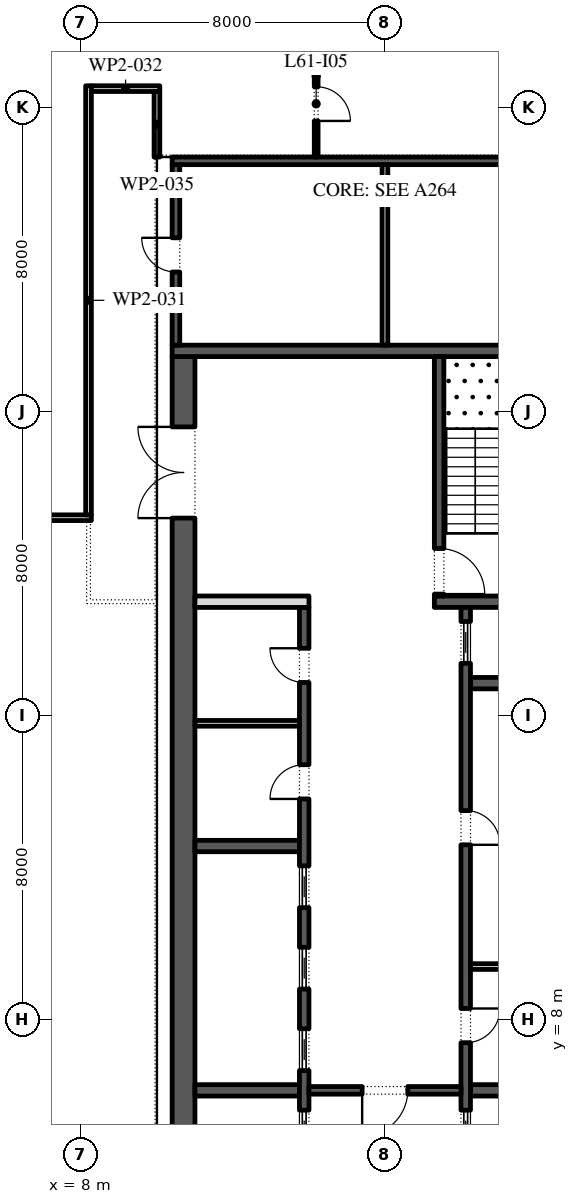
"""IFC4 building model, lengths in metres.
Left out: names, types, materials, properties, quantities, classifications, styles, units other than length and angle.
Written with IfcOpenShell. Run it as: python <this file> out.ifc"""

import sys

from ifc_helpers import new_model, si_unit, direction, frame, frame_2d, origin, place, context, subcontext, project, spatial, rectangle, extrude, element, fill, save


model = new_model("IFC4")
c1 = context("Model", 3, precision=1e-05, world=origin(), true_north=direction((0.0, 1.0)))
c2 = subcontext(c1, "Body", "Model", "MODEL_VIEW")
j1 = project(units=[si_unit("LENGTHUNIT", "METRE"), si_unit("PLANEANGLEUNIT", "RADIAN")], contexts=[c1])
p1 = place(None, origin())
s1 = spatial("IfcSite", under=j1, at=p1, CompositionType="ELEMENT")
p2 = place(p1, origin())
s2 = spatial("IfcBuilding", under=s1, at=p2, CompositionType="ELEMENT")
p3 = place(p2, frame((0.0, 0.0, 280.8)))
s3 = spatial("IfcBuildingStorey", under=s2, at=p3, CompositionType="ELEMENT", Elevation=280.8)
p4 = place(p3, frame((10.7, -2.45, 0.0), z_axis=(0.0, 0.0, 1.0), x_axis=(0.0, 1.0, 0.0)))
e1 = element("IfcWall", 1, at=p4, inside=s3, PredefinedType="SHEAR", context=c2, shape_type="SweptSolid", body=[
    extrude(rectangle(XDim=27.9, YDim=0.6, at=frame_2d((13.95, 0.0))), origin(), (0.0, 0.0, 1.0), 4.0),
])
p5 = place(p4, frame((23.65, 0.0, 0.0)))
e2 = element("IfcOpeningElement", 2, at=p5, cuts=e1, PredefinedType="OPENING", context=c2, shape_type="SweptSolid", body=[
    extrude(rectangle(XDim=2.4, YDim=2.1, at=frame_2d((1.2, 1.05))), frame((0.0, 0.31, 0.0), z_axis=(0.0, -1.0, 0.0), x_axis=(1.0, 0.0, 0.0)), (0.0, 0.0, 1.0), 0.62),
])
p6 = place(p4, frame((1.087, 0.0, 0.0)))
e3 = element("IfcOpeningElement", 3, at=p6, cuts=e1, PredefinedType="OPENING", context=c2, shape_type="SweptSolid", body=[
    extrude(rectangle(XDim=0.9, YDim=2.1, at=frame_2d((0.45, 1.05))), frame((0.0, 0.31, 0.0), z_axis=(0.0, -1.0, 0.0), x_axis=(1.0, 0.0, 0.0)), (0.0, 0.0, 1.0), 0.62),
])
p7 = place(p4, frame((4.262, 0.0, 0.0)))
e4 = element("IfcOpeningElement", 4, at=p7, cuts=e1, PredefinedType="OPENING", context=c2, shape_type="SweptSolid", body=[
    extrude(rectangle(XDim=1.0, YDim=2.1, at=frame_2d((0.5, 1.05))), frame((0.0, 0.31, 0.0), z_axis=(0.0, -1.0, 0.0), x_axis=(1.0, 0.0, 0.0)), (0.0, 0.0, 1.0), 0.62),
])
p8 = place(p3, frame((10.4, 25.6, 0.0), z_axis=(0.0, 0.0, 1.0), x_axis=(1.0, 0.0, 0.0)))
e5 = element("IfcWall", 5, at=p8, inside=s3, PredefinedType="SHEAR", context=c2, shape_type="SweptSolid", body=[
    extrude(rectangle(XDim=11.2, YDim=0.3, at=frame_2d((5.6, 0.0))), origin(), (0.0, 0.0, 1.0), 4.0),
])
p9 = place(p3, frame((17.3, 19.0, 0.0), z_axis=(0.0, 0.0, 1.0), x_axis=(1.0, 0.0, 0.0)))
e6 = element("IfcWall", 6, at=p9, inside=s3, PredefinedType="SHEAR", context=c2, shape_type="SweptSolid", body=[
    extrude(rectangle(XDim=3.7, YDim=0.3, at=frame_2d((1.85, 0.0))), origin(), (0.0, 0.0, 1.0), 4.0),
])
p10 = place(p3, frame((17.425, 19.15, 0.0), z_axis=(0.0, 0.0, 1.0), x_axis=(0.0, 1.0, 0.0)))
e7 = element("IfcWall", 7, at=p10, inside=s3, PredefinedType="SHEAR", context=c2, shape_type="SweptSolid", body=[
    extrude(rectangle(XDim=6.3, YDim=0.25, at=frame_2d((3.15, 0.0))), origin(), (0.0, 0.0, 1.0), 4.0),
])
p11 = place(p10, frame((0.05, 0.0, 0.0)))
e8 = element("IfcOpeningElement", 8, at=p11, cuts=e7, PredefinedType="OPENING", context=c2, shape_type="SweptSolid", body=[
    extrude(rectangle(XDim=1.2, YDim=2.1, at=frame_2d((0.6, 1.05))), frame((0.0, 0.135, 0.0), z_axis=(0.0, -1.0, 0.0), x_axis=(1.0, 0.0, 0.0)), (0.0, 0.0, 1.0), 0.27),
])
for number, where, z_axis, x_axis in (
    (9, (18.25, 6.143, 0.0), (0.0, 0.0, 1.0), (1.0, 0.0, 0.0)),
    (10, (18.25, 16.857, 0.0), (0.0, 0.0, 1.0), (1.0, 0.0, 0.0)),
):
    element("IfcWall", number, at=place(p3, frame(where, z_axis=z_axis, x_axis=x_axis)), inside=s3, PredefinedType="SHEAR", context=c2, shape_type="SweptSolid", body=[
        extrude(rectangle(XDim=2.75, YDim=0.3, at=frame_2d((1.375, 0.0))), origin(), (0.0, 0.0, 1.0), 4.0),
    ])
p12 = place(p3, frame((18.125, 4.15, 0.0), z_axis=(0.0, 0.0, 1.0), x_axis=(0.0, 1.0, 0.0)))
e11 = element("IfcWall", 11, at=p12, inside=s3, PredefinedType="SHEAR", context=c2, shape_type="SweptSolid", body=[
    extrude(rectangle(XDim=14.7, YDim=0.25, at=frame_2d((7.35, 0.0))), origin(), (0.0, 0.0, 1.0), 4.0),
])
p13 = place(p12, frame((3.246, 0.0, 0.0)))
e12 = element("IfcOpeningElement", 12, at=p13, cuts=e11, PredefinedType="OPENING", context=c2, shape_type="SweptSolid", body=[
    extrude(rectangle(XDim=0.9, YDim=2.1, at=frame_2d((0.45, 1.05))), frame((0.0, 0.135, 0.0), z_axis=(0.0, -1.0, 0.0), x_axis=(1.0, 0.0, 0.0)), (0.0, 0.0, 1.0), 0.27),
])
p14 = place(p12, frame((8.454, 0.0, 0.0)))
e13 = element("IfcOpeningElement", 13, at=p14, cuts=e11, PredefinedType="OPENING", context=c2, shape_type="SweptSolid", body=[
    extrude(rectangle(XDim=0.9, YDim=2.1, at=frame_2d((0.45, 1.05))), frame((0.0, 0.135, 0.0), z_axis=(0.0, -1.0, 0.0), x_axis=(1.0, 0.0, 0.0)), (0.0, 0.0, 1.0), 0.27),
])
p15 = place(p12, frame((0.371, 0.0, 0.0)))
e14 = element("IfcOpeningElement", 14, at=p15, cuts=e11, PredefinedType="OPENING", context=c2, shape_type="SweptSolid", body=[
    extrude(rectangle(XDim=1.1, YDim=2.1, at=frame_2d((0.55, 1.05))), frame((0.0, 0.135, 0.0), z_axis=(0.0, -1.0, 0.0), x_axis=(1.0, 0.0, 0.0)), (0.0, 0.0, 1.0), 0.27),
])
p16 = place(p12, frame((13.229, 0.0, 0.0)))
e15 = element("IfcOpeningElement", 15, at=p16, cuts=e11, PredefinedType="OPENING", context=c2, shape_type="SweptSolid", body=[
    extrude(rectangle(XDim=1.1, YDim=2.1, at=frame_2d((0.55, 1.05))), frame((0.0, 0.135, 0.0), z_axis=(0.0, -1.0, 0.0), x_axis=(1.0, 0.0, 0.0)), (0.0, 0.0, 1.0), 0.27),
])
p17 = place(p3, frame((18.25, 9.4, 0.0), z_axis=(0.0, 0.0, 1.0), x_axis=(1.0, 0.0, 0.0)))
e16 = element("IfcWall", 16, at=p17, inside=s3, PredefinedType="PARTITIONING", context=c2, shape_type="SweptSolid", body=[
    extrude(rectangle(XDim=2.75, YDim=0.15, at=frame_2d((1.375, 0.0))), origin(), (0.0, 0.0, 1.0), 4.0),
])
for number, where, z_axis, x_axis in (
    (17, (11.0, 6.143, 0.0), (0.0, 0.0, 1.0), (1.0, 0.0, 0.0)),
    (18, (11.0, 12.571, 0.0), (0.0, 0.0, 1.0), (1.0, 0.0, 0.0)),
):
    element("IfcWall", number, at=place(p3, frame(where, z_axis=z_axis, x_axis=x_axis)), inside=s3, PredefinedType="SHEAR", context=c2, shape_type="SweptSolid", body=[
        extrude(rectangle(XDim=2.75, YDim=0.3, at=frame_2d((1.375, 0.0))), origin(), (0.0, 0.0, 1.0), 4.0),
    ])
p18 = place(p3, frame((13.875, -2.45, 0.0), z_axis=(0.0, 0.0, 1.0), x_axis=(0.0, 1.0, 0.0)))
e19 = element("IfcWall", 19, at=p18, inside=s3, PredefinedType="SHEAR", context=c2, shape_type="SweptSolid", body=[
    extrude(rectangle(XDim=21.3, YDim=0.25, at=frame_2d((10.65, 0.0))), origin(), (0.0, 0.0, 1.0), 4.0),
])
p19 = place(p18, frame((16.261, 0.0, 0.0)))
e20 = element("IfcOpeningElement", 20, at=p19, cuts=e19, PredefinedType="OPENING", context=c2, shape_type="SweptSolid", body=[
    extrude(rectangle(XDim=0.9, YDim=2.1, at=frame_2d((0.45, 1.05))), frame((0.0, 0.135, 0.0), z_axis=(0.0, -1.0, 0.0), x_axis=(1.0, 0.0, 0.0)), (0.0, 0.0, 1.0), 0.27),
])
p20 = place(p18, frame((19.325, 0.0, 0.0)))
e21 = element("IfcOpeningElement", 21, at=p20, cuts=e19, PredefinedType="OPENING", context=c2, shape_type="SweptSolid", body=[
    extrude(rectangle(XDim=0.9, YDim=2.1, at=frame_2d((0.45, 1.05))), frame((0.0, 0.135, 0.0), z_axis=(0.0, -1.0, 0.0), x_axis=(1.0, 0.0, 0.0)), (0.0, 0.0, 1.0), 0.27),
])
p21 = place(p18, frame((6.971, 0.0, 0.0)))
e22 = element("IfcOpeningElement", 22, at=p21, cuts=e19, PredefinedType="OPENING", context=c2, shape_type="SweptSolid", body=[
    extrude(rectangle(XDim=1.1, YDim=2.1, at=frame_2d((0.55, 1.05))), frame((0.0, 0.135, 0.0), z_axis=(0.0, -1.0, 0.0), x_axis=(1.0, 0.0, 0.0)), (0.0, 0.0, 1.0), 0.27),
])
p22 = place(p18, frame((9.114, 0.0, 0.0)))
e23 = element("IfcOpeningElement", 23, at=p22, cuts=e19, PredefinedType="OPENING", context=c2, shape_type="SweptSolid", body=[
    extrude(rectangle(XDim=1.1, YDim=2.1, at=frame_2d((0.55, 1.05))), frame((0.0, 0.135, 0.0), z_axis=(0.0, -1.0, 0.0), x_axis=(1.0, 0.0, 0.0)), (0.0, 0.0, 1.0), 0.27),
])
p23 = place(p18, frame((11.257, 0.0, 0.0)))
e24 = element("IfcOpeningElement", 24, at=p23, cuts=e19, PredefinedType="OPENING", context=c2, shape_type="SweptSolid", body=[
    extrude(rectangle(XDim=1.1, YDim=2.1, at=frame_2d((0.55, 1.05))), frame((0.0, 0.135, 0.0), z_axis=(0.0, -1.0, 0.0), x_axis=(1.0, 0.0, 0.0)), (0.0, 0.0, 1.0), 0.27),
])
p24 = place(p18, frame((13.4, 0.0, 0.0)))
e25 = element("IfcOpeningElement", 25, at=p24, cuts=e19, PredefinedType="OPENING", context=c2, shape_type="SweptSolid", body=[
    extrude(rectangle(XDim=1.1, YDim=2.1, at=frame_2d((0.55, 1.05))), frame((0.0, 0.135, 0.0), z_axis=(0.0, -1.0, 0.0), x_axis=(1.0, 0.0, 0.0)), (0.0, 0.0, 1.0), 0.27),
])
p25 = place(p3, frame((11.0, 19.0, 0.0), z_axis=(0.0, 0.0, 1.0), x_axis=(1.0, 0.0, 0.0)))
e26 = element("IfcWall", 26, at=p25, inside=s3, PredefinedType="PARTITIONING", context=c2, shape_type="SweptSolid", body=[
    extrude(rectangle(XDim=3.0, YDim=0.3, at=frame_2d((1.5, 0.0))), origin(), (0.0, 0.0, 1.0), 4.0),
])
p26 = place(p3, frame((11.0, 15.8, 0.0), z_axis=(0.0, 0.0, 1.0), x_axis=(1.0, 0.0, 0.0)))
e27 = element("IfcWall", 27, at=p26, inside=s3, PredefinedType="PARTITIONING", context=c2, shape_type="SweptSolid", body=[
    extrude(rectangle(XDim=2.75, YDim=0.15, at=frame_2d((1.375, 0.0))), origin(), (0.0, 0.0, 1.0), 4.0),
])
p27 = place(p3, frame((14.0, 6.143, 0.0), z_axis=(0.0, 0.0, 1.0), x_axis=(1.0, 0.0, 0.0)))
e28 = element("IfcWall", 28, at=p27, inside=s3, PredefinedType="SHEAR", context=c2, shape_type="SweptSolid", body=[
    extrude(rectangle(XDim=4.0, YDim=0.2, at=frame_2d((2.0, 0.0))), origin(), (0.0, 0.0, 1.0), 4.0),
])
p28 = place(p27, frame((1.4, 0.0, 0.0)))
e29 = element("IfcOpeningElement", 29, at=p28, cuts=e28, PredefinedType="OPENING", context=c2, shape_type="SweptSolid", body=[
    extrude(rectangle(XDim=1.2, YDim=2.1, at=frame_2d((0.6, 1.05))), frame((0.0, 0.11, 0.0), z_axis=(0.0, -1.0, 0.0), x_axis=(1.0, 0.0, 0.0)), (0.0, 0.0, 1.0), 0.22),
])
p29 = place(p3, frame((10.5, 25.75, 0.0), z_axis=(0.0, 0.0, 1.0), x_axis=(0.0, 1.0, 0.0)))
e30 = element("IfcWall", 30, at=p29, inside=s3, PredefinedType="SHEAR", context=c2, shape_type="SweptSolid", body=[
    extrude(rectangle(XDim=4.75, YDim=0.2, at=frame_2d((2.375, 0.0))), origin(), (0.0, 0.0, 1.0), 4.0),
])
p30 = place(p29, frame((1.925, 0.0, 0.0)))
e31 = element("IfcOpeningElement", 31, at=p30, cuts=e30, PredefinedType="OPENING", context=c2, shape_type="SweptSolid", body=[
    extrude(rectangle(XDim=0.9, YDim=2.1, at=frame_2d((0.45, 1.05))), frame((0.0, 0.11, 0.0), z_axis=(0.0, -1.0, 0.0), x_axis=(1.0, 0.0, 0.0)), (0.0, 0.0, 1.0), 0.22),
])
p31 = place(p3, frame((10.4, 30.6, 0.0), z_axis=(0.0, 0.0, 1.0), x_axis=(1.0, 0.0, 0.0)))
e32 = element("IfcWall", 32, at=p31, inside=s3, PredefinedType="SHEAR", context=c2, shape_type="SweptSolid", body=[
    extrude(rectangle(XDim=11.2, YDim=0.2, at=frame_2d((5.6, 0.0))), origin(), (0.0, 0.0, 1.0), 4.0),
])
p32 = place(p3, frame((16.0, 25.75, 0.0), z_axis=(0.0, 0.0, 1.0), x_axis=(0.0, 1.0, 0.0)))
e33 = element("IfcWall", 33, at=p32, inside=s3, PredefinedType="PARTITIONING", context=c2, shape_type="SweptSolid", body=[
    extrude(rectangle(XDim=4.75, YDim=0.15, at=frame_2d((2.375, 0.0))), origin(), (0.0, 0.0, 1.0), 4.0),
])
p33 = place(p3, frame((0.915, 21.21, 0.0), z_axis=(0.0, 0.0, 1.0), x_axis=(1.0, 0.0, 0.0)))
e34 = element("IfcWall", 34, at=p33, inside=s3, PredefinedType="PARTITIONING", context=c2, shape_type="SweptSolid", body=[
    extrude(rectangle(XDim=7.36, YDim=0.15, at=frame_2d((3.68, 0.0))), origin(), (0.0, 0.0, 1.0), 4.0),
])
p34 = place(p3, frame((8.2, 21.285, 0.0), z_axis=(0.0, 0.0, 1.0), x_axis=(0.0, 1.0, 0.0)))
e35 = element("IfcWall", 35, at=p34, inside=s3, PredefinedType="PARTITIONING", context=c2, shape_type="SweptSolid", body=[
    extrude(rectangle(XDim=11.29, YDim=0.15, at=frame_2d((5.645, 0.0))), origin(), (0.0, 0.0, 1.0), 4.0),
])
p35 = place(p3, frame((8.275, 32.5, 0.0), z_axis=(0.0, 0.0, 1.0), x_axis=(1.0, 0.0, 0.0)))
e36 = element("IfcWall", 36, at=p35, inside=s3, PredefinedType="PARTITIONING", context=c2, shape_type="SweptSolid", body=[
    extrude(rectangle(XDim=1.8, YDim=0.15, at=frame_2d((0.9, 0.0))), origin(), (0.0, 0.0, 1.0), 4.0),
])
p36 = place(p3, frame((10.0, 32.425, 0.0), z_axis=(0.0, 0.0, 1.0), x_axis=(0.0, -1.0, 0.0)))
e37 = element("IfcWall", 37, at=p36, inside=s3, PredefinedType="PARTITIONING", context=c2, shape_type="SweptSolid", body=[
    extrude(rectangle(XDim=1.725, YDim=0.15, at=frame_2d((0.863, 0.0))), origin(), (0.0, 0.0, 1.0), 4.0),
])
p37 = place(p3, frame((14.19, 34.95, 0.0), z_axis=(0.0, 0.0, 1.0), x_axis=(0.0, -1.0, 0.0)))
e38 = element("IfcWall", 38, at=p37, inside=s3, PredefinedType="PARTITIONING", context=c2, shape_type="SweptSolid", body=[
    extrude(rectangle(XDim=4.25, YDim=0.1, at=frame_2d((2.125, 0.0))), origin(), (0.0, 0.0, 1.0), 4.0),
])
p38 = place(p37, frame((2.4, 0.0, 0.0)))
e39 = element("IfcOpeningElement", 39, at=p38, cuts=e38, PredefinedType="OPENING", context=c2, shape_type="SweptSolid", body=[
    extrude(rectangle(XDim=0.9, YDim=2.1, at=frame_2d((0.45, 1.05))), frame((0.0, 0.06, 0.0), z_axis=(0.0, -1.0, 0.0), x_axis=(1.0, 0.0, 0.0)), (0.0, 0.0, 1.0), 0.12),
])
p39 = place(p13, frame((0.9, -0.2, 0.0), z_axis=(0.0, 0.0, 1.0), x_axis=(-1.0, 0.0, 0.0)))
e40 = element("IfcDoor", 40, at=p39, inside=s3, OperationType="SINGLE_SWING_RIGHT", PredefinedType="DOOR", context=c2, shape_type="SweptSolid", body=[
    extrude(rectangle(XDim=0.9, YDim=2.1, at=frame_2d((0.45, 1.05))), frame((0.0, -0.075, 0.0), z_axis=(0.0, -1.0, 0.0), x_axis=(1.0, 0.0, 0.0)), (0.0, 0.0, 1.0), 0.05),
])
fill(e12, e40)
p40 = place(p14, frame((0.9, -0.2, 0.0), z_axis=(0.0, 0.0, 1.0), x_axis=(-1.0, 0.0, 0.0)))
e41 = element("IfcDoor", 41, at=p40, inside=s3, OperationType="SINGLE_SWING_LEFT", PredefinedType="DOOR", context=c2, shape_type="SweptSolid", body=[
    extrude(rectangle(XDim=0.9, YDim=2.1, at=frame_2d((0.45, 1.05))), frame((0.0, -0.075, 0.0), z_axis=(0.0, -1.0, 0.0), x_axis=(1.0, 0.0, 0.0)), (0.0, 0.0, 1.0), 0.05),
])
fill(e13, e41)
p41 = place(p15, origin())
e42 = element("IfcDoor", 42, at=p41, inside=s3, OperationType="SLIDING_TO_LEFT", PredefinedType="DOOR", context=c2, shape_type="SweptSolid", body=[
    extrude(rectangle(XDim=1.1, YDim=2.1, at=frame_2d((0.55, 1.05))), frame((0.0, 0.025, 0.0), z_axis=(0.0, -1.0, 0.0), x_axis=(1.0, 0.0, 0.0)), (0.0, 0.0, 1.0), 0.05),
])
fill(e14, e42)
p42 = place(p16, origin())
e43 = element("IfcDoor", 43, at=p42, inside=s3, OperationType="SLIDING_TO_LEFT", PredefinedType="DOOR", context=c2, shape_type="SweptSolid", body=[
    extrude(rectangle(XDim=1.1, YDim=2.1, at=frame_2d((0.55, 1.05))), frame((0.0, 0.025, 0.0), z_axis=(0.0, -1.0, 0.0), x_axis=(1.0, 0.0, 0.0)), (0.0, 0.0, 1.0), 0.05),
])
fill(e15, e43)
p43 = place(p19, origin())
e44 = element("IfcDoor", 44, at=p43, inside=s3, OperationType="SINGLE_SWING_RIGHT", PredefinedType="DOOR", context=c2, shape_type="SweptSolid", body=[
    extrude(rectangle(XDim=0.9, YDim=2.1, at=frame_2d((0.45, 1.05))), frame((0.0, 0.125, 0.0), z_axis=(0.0, -1.0, 0.0), x_axis=(1.0, 0.0, 0.0)), (0.0, 0.0, 1.0), 0.05),
])
fill(e20, e44)
p44 = place(p20, origin())
e45 = element("IfcDoor", 45, at=p44, inside=s3, OperationType="SINGLE_SWING_LEFT", PredefinedType="DOOR", context=c2, shape_type="SweptSolid", body=[
    extrude(rectangle(XDim=0.9, YDim=2.1, at=frame_2d((0.45, 1.05))), frame((0.0, 0.125, 0.0), z_axis=(0.0, -1.0, 0.0), x_axis=(1.0, 0.0, 0.0)), (0.0, 0.0, 1.0), 0.05),
])
fill(e21, e45)
p45 = place(p21, origin())
e46 = element("IfcDoor", 46, at=p45, inside=s3, OperationType="SLIDING_TO_LEFT", PredefinedType="DOOR", context=c2, shape_type="SweptSolid", body=[
    extrude(rectangle(XDim=1.1, YDim=2.1, at=frame_2d((0.55, 1.05))), frame((0.0, 0.025, 0.0), z_axis=(0.0, -1.0, 0.0), x_axis=(1.0, 0.0, 0.0)), (0.0, 0.0, 1.0), 0.05),
])
fill(e22, e46)
p46 = place(p22, origin())
e47 = element("IfcDoor", 47, at=p46, inside=s3, OperationType="SLIDING_TO_LEFT", PredefinedType="DOOR", context=c2, shape_type="SweptSolid", body=[
    extrude(rectangle(XDim=1.1, YDim=2.1, at=frame_2d((0.55, 1.05))), frame((0.0, 0.025, 0.0), z_axis=(0.0, -1.0, 0.0), x_axis=(1.0, 0.0, 0.0)), (0.0, 0.0, 1.0), 0.05),
])
fill(e23, e47)
p47 = place(p23, origin())
e48 = element("IfcDoor", 48, at=p47, inside=s3, OperationType="SLIDING_TO_LEFT", PredefinedType="DOOR", context=c2, shape_type="SweptSolid", body=[
    extrude(rectangle(XDim=1.1, YDim=2.1, at=frame_2d((0.55, 1.05))), frame((0.0, 0.025, 0.0), z_axis=(0.0, -1.0, 0.0), x_axis=(1.0, 0.0, 0.0)), (0.0, 0.0, 1.0), 0.05),
])
fill(e24, e48)
p48 = place(p24, origin())
e49 = element("IfcDoor", 49, at=p48, inside=s3, OperationType="SLIDING_TO_LEFT", PredefinedType="DOOR", context=c2, shape_type="SweptSolid", body=[
    extrude(rectangle(XDim=1.1, YDim=2.1, at=frame_2d((0.55, 1.05))), frame((0.0, 0.025, 0.0), z_axis=(0.0, -1.0, 0.0), x_axis=(1.0, 0.0, 0.0)), (0.0, 0.0, 1.0), 0.05),
])
fill(e25, e49)
p49 = place(p28, frame((1.2, 0.0, 0.0), z_axis=(0.0, 0.0, 1.0), x_axis=(-1.0, 0.0, 0.0)))
e50 = element("IfcDoor", 50, at=p49, inside=s3, OperationType="SINGLE_SWING_LEFT", PredefinedType="DOOR", context=c2, shape_type="SweptSolid", body=[
    extrude(rectangle(XDim=1.2, YDim=2.1, at=frame_2d((0.6, 1.05))), frame((0.0, 0.025, 0.0), z_axis=(0.0, -1.0, 0.0), x_axis=(1.0, 0.0, 0.0)), (0.0, 0.0, 1.0), 0.05),
])
fill(e29, e50)
p50 = place(p5, origin())
e51 = element("IfcDoor", 51, at=p50, inside=s3, OperationType="DOUBLE_DOOR_SINGLE_SWING", PredefinedType="DOOR", context=c2, shape_type="SweptSolid", body=[
    extrude(rectangle(XDim=2.4, YDim=2.1, at=frame_2d((1.2, 1.05))), frame((0.0, 0.025, 0.0), z_axis=(0.0, -1.0, 0.0), x_axis=(1.0, 0.0, 0.0)), (0.0, 0.0, 1.0), 0.05),
])
fill(e2, e51)
p51 = place(p11, frame((1.2, 0.0, 0.0), z_axis=(0.0, 0.0, 1.0), x_axis=(-1.0, 0.0, 0.0)))
e52 = element("IfcDoor", 52, at=p51, inside=s3, OperationType="SINGLE_SWING_LEFT", PredefinedType="DOOR", context=c2, shape_type="SweptSolid", body=[
    extrude(rectangle(XDim=1.2, YDim=2.1, at=frame_2d((0.6, 1.05))), frame((0.0, 0.025, 0.0), z_axis=(0.0, -1.0, 0.0), x_axis=(1.0, 0.0, 0.0)), (0.0, 0.0, 1.0), 0.05),
])
fill(e8, e52)
p52 = place(p30, origin())
e53 = element("IfcDoor", 53, at=p52, inside=s3, OperationType="SINGLE_SWING_LEFT", PredefinedType="DOOR", context=c2, shape_type="SweptSolid", body=[
    extrude(rectangle(XDim=0.9, YDim=2.1, at=frame_2d((0.45, 1.05))), frame((0.0, -0.05, 0.0), z_axis=(0.0, -1.0, 0.0), x_axis=(1.0, 0.0, 0.0)), (0.0, 0.0, 1.0), 0.05),
])
fill(e31, e53)
p53 = place(p38, origin())
e54 = element("IfcDoor", 54, at=p53, inside=s3, OperationType="SINGLE_SWING_LEFT", PredefinedType="DOOR", context=c2, shape_type="SweptSolid", body=[
    extrude(rectangle(XDim=0.9, YDim=2.1, at=frame_2d((0.45, 1.05))), frame((0.0, 0.025, 0.0), z_axis=(0.0, -1.0, 0.0), x_axis=(1.0, 0.0, 0.0)), (0.0, 0.0, 1.0), 0.05),
])
fill(e39, e54)
save(model, sys.argv[1])
